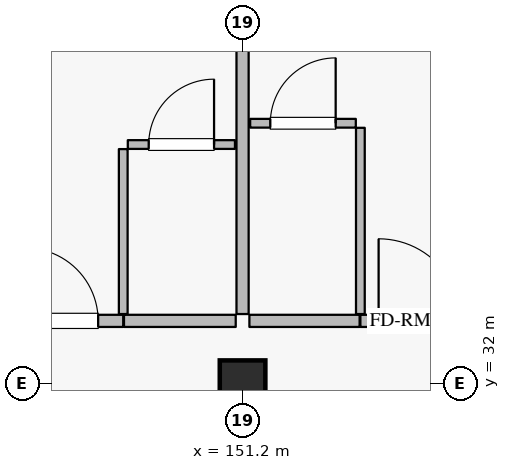
"""IFC4 building model, lengths in metres.
Left out: names, types, materials, properties, quantities, classifications, styles, units other than length and angle.
Written with IfcOpenShell. Run it as: python <this file> out.ifc"""

import sys

from ifc_helpers import new_model, si_unit, direction, frame, frame_2d, origin, origin_2d, place, context, subcontext, project, spatial, rectangle, extrude, element, fill, save


model = new_model("IFC4")
c1 = context("Model", 3, precision=1e-05, world=origin(), true_north=direction((0.0, 1.0)))
c2 = subcontext(c1, "Body", "Model", "MODEL_VIEW")
j1 = project(units=[si_unit("LENGTHUNIT", "METRE"), si_unit("PLANEANGLEUNIT", "RADIAN")], contexts=[c1])
p1 = place(None, origin())
s1 = spatial("IfcSite", under=j1, at=p1, CompositionType="ELEMENT")
p2 = place(p1, origin())
s2 = spatial("IfcBuilding", under=s1, at=p2, CompositionType="ELEMENT")
p3 = place(p2, frame((0.0, 0.0, 39.6)))
s3 = spatial("IfcBuildingStorey", under=s2, at=p3, CompositionType="ELEMENT", Elevation=39.6)
p4 = place(p3, frame((151.2, 32.0, 0.0), z_axis=(0.0, 0.0, 1.0), x_axis=(1.0, 0.0, 0.0)))
e1 = element("IfcColumn", 1, at=p4, inside=s3, PredefinedType="COLUMN", context=c2, shape_type="SweptSolid", body=[
    extrude(rectangle(XDim=0.6, YDim=0.6, at=origin_2d()), origin(), (0.0, 0.0, 1.0), 3.6),
])
p5 = place(p3, frame((143.1, 32.286, 0.0), z_axis=(0.0, 0.0, 1.0), x_axis=(0.724145477467, 0.689647248573, 0.0)))
e2 = element("IfcWall", 2, at=p5, inside=s3, PredefinedType="SOLIDWALL", context=c2, shape_type="SweptSolid", body=[
    extrude(rectangle(XDim=10.771, YDim=0.24, at=frame_2d((5.385, 0.0))), origin(), (0.0, 0.0, 1.0), 2.94),
])
p6 = place(p5, frame((0.194, 0.0, 0.8)))
e3 = element("IfcOpeningElement", 3, at=p6, cuts=e2, PredefinedType="OPENING", context=c2, shape_type="SweptSolid", body=[
    extrude(rectangle(XDim=1.6, YDim=1.6, at=frame_2d((0.8, 0.8))), frame((0.0, 0.13, 0.0), z_axis=(0.0, -1.0, 0.0), x_axis=(1.0, 0.0, 0.0)), (0.0, 0.0, 1.0), 0.26),
])
p7 = place(p5, frame((3.591, 0.0, 0.8)))
e4 = element("IfcOpeningElement", 4, at=p7, cuts=e2, PredefinedType="OPENING", context=c2, shape_type="SweptSolid", body=[
    extrude(rectangle(XDim=1.6, YDim=1.6, at=frame_2d((0.8, 0.8))), frame((0.0, 0.13, 0.0), z_axis=(0.0, -1.0, 0.0), x_axis=(1.0, 0.0, 0.0)), (0.0, 0.0, 1.0), 0.26),
])
p8 = place(p5, frame((7.983, 0.0, 0.8)))
e5 = element("IfcOpeningElement", 5, at=p8, cuts=e2, PredefinedType="OPENING", context=c2, shape_type="SweptSolid", body=[
    extrude(rectangle(XDim=1.6, YDim=1.6, at=frame_2d((0.8, 0.8))), frame((0.0, 0.13, 0.0), z_axis=(0.0, -1.0, 0.0), x_axis=(1.0, 0.0, 0.0)), (0.0, 0.0, 1.0), 0.26),
])
p9 = place(p3, frame((148.01, 32.82, 0.0), z_axis=(0.0, 0.0, 1.0), x_axis=(1.0, 0.0, 0.0)))
e6 = element("IfcWall", 6, at=p9, inside=s3, PredefinedType="PARTITIONING", context=c2, shape_type="SweptSolid", body=[
    extrude(rectangle(XDim=1.62, YDim=0.16, at=frame_2d((0.81, 0.0))), origin(), (0.0, 0.0, 1.0), 3.335),
])
p10 = place(p9, frame((0.33, 0.0, 0.0)))
e7 = element("IfcOpeningElement", 7, at=p10, cuts=e6, PredefinedType="OPENING", context=c2, shape_type="SweptSolid", body=[
    extrude(rectangle(XDim=0.96, YDim=2.2, at=frame_2d((0.48, 1.1))), frame((0.0, 0.09, 0.0), z_axis=(0.0, -1.0, 0.0), x_axis=(1.0, 0.0, 0.0)), (0.0, 0.0, 1.0), 0.18),
])
p11 = place(p3, frame((149.64, 32.82, 0.0), z_axis=(0.0, 0.0, 1.0), x_axis=(1.0, 0.0, 0.0)))
e8 = element("IfcWall", 8, at=p11, inside=s3, PredefinedType="PARTITIONING", context=c2, shape_type="SweptSolid", body=[
    extrude(rectangle(XDim=1.47, YDim=0.16, at=frame_2d((0.735, 0.0))), origin(), (0.0, 0.0, 1.0), 3.335),
])
p12 = place(p3, frame((149.63, 32.91, 0.0), z_axis=(0.0, 0.0, 1.0), x_axis=(0.0, 1.0, 0.0)))
e9 = element("IfcWall", 9, at=p12, inside=s3, PredefinedType="PARTITIONING", context=c2, shape_type="SweptSolid", body=[
    extrude(rectangle(XDim=2.17, YDim=0.115, at=frame_2d((1.085, 0.0))), origin(), (0.0, 0.0, 1.0), 3.335),
])
p13 = place(p3, frame((149.69, 35.14, 0.0), z_axis=(0.0, 0.0, 1.0), x_axis=(1.0, 0.0, 0.0)))
e10 = element("IfcWall", 10, at=p13, inside=s3, PredefinedType="PARTITIONING", context=c2, shape_type="SweptSolid", body=[
    extrude(rectangle(XDim=1.41, YDim=0.115, at=frame_2d((0.705, 0.0))), origin(), (0.0, 0.0, 1.0), 3.335),
])
p14 = place(p13, frame((0.275, 0.0, 0.0)))
e11 = element("IfcOpeningElement", 11, at=p14, cuts=e10, PredefinedType="OPENING", context=c2, shape_type="SweptSolid", body=[
    extrude(rectangle(XDim=0.86, YDim=2.12, at=frame_2d((0.43, 1.06))), frame((0.0, 0.067, 0.0), z_axis=(0.0, -1.0, 0.0), x_axis=(1.0, 0.0, 0.0)), (0.0, 0.0, 1.0), 0.135),
])
p15 = place(p3, frame((151.29, 32.82, 0.0), z_axis=(0.0, 0.0, 1.0), x_axis=(1.0, 0.0, 0.0)))
e12 = element("IfcWall", 12, at=p15, inside=s3, PredefinedType="PARTITIONING", context=c2, shape_type="SweptSolid", body=[
    extrude(rectangle(XDim=1.45, YDim=0.16, at=frame_2d((0.725, 0.0))), origin(), (0.0, 0.0, 1.0), 3.335),
])
p16 = place(p3, frame((152.75, 32.82, 0.0), z_axis=(0.0, 0.0, 1.0), x_axis=(1.0, 0.0, 0.0)))
e13 = element("IfcWall", 13, at=p16, inside=s3, PredefinedType="PARTITIONING", context=c2, shape_type="SweptSolid", body=[
    extrude(rectangle(XDim=1.56, YDim=0.16, at=frame_2d((0.78, 0.0))), origin(), (0.0, 0.0, 1.0), 3.335),
])
p17 = place(p16, frame((0.24, 0.0, 0.0)))
e14 = element("IfcOpeningElement", 14, at=p17, cuts=e13, PredefinedType="OPENING", context=c2, shape_type="SweptSolid", body=[
    extrude(rectangle(XDim=1.08, YDim=2.3, at=frame_2d((0.54, 1.15))), frame((0.0, 0.09, 0.0), z_axis=(0.0, -1.0, 0.0), x_axis=(1.0, 0.0, 0.0)), (0.0, 0.0, 1.0), 0.18),
])
p18 = place(p3, frame((152.75, 32.91, 0.0), z_axis=(0.0, 0.0, 1.0), x_axis=(0.0, 1.0, 0.0)))
e15 = element("IfcWall", 15, at=p18, inside=s3, PredefinedType="PARTITIONING", context=c2, shape_type="SweptSolid", body=[
    extrude(rectangle(XDim=2.45, YDim=0.115, at=frame_2d((1.225, 0.0))), origin(), (0.0, 0.0, 1.0), 3.335),
])
p19 = place(p3, frame((151.3, 35.42, 0.0), z_axis=(0.0, 0.0, 1.0), x_axis=(1.0, 0.0, 0.0)))
e16 = element("IfcWall", 16, at=p19, inside=s3, PredefinedType="PARTITIONING", context=c2, shape_type="SweptSolid", body=[
    extrude(rectangle(XDim=1.39, YDim=0.115, at=frame_2d((0.695, 0.0))), origin(), (0.0, 0.0, 1.0), 3.335),
])
p20 = place(p19, frame((0.265, 0.0, 0.0)))
e17 = element("IfcOpeningElement", 17, at=p20, cuts=e16, PredefinedType="OPENING", context=c2, shape_type="SweptSolid", body=[
    extrude(rectangle(XDim=0.86, YDim=2.12, at=frame_2d((0.43, 1.06))), frame((0.0, 0.067, 0.0), z_axis=(0.0, -1.0, 0.0), x_axis=(1.0, 0.0, 0.0)), (0.0, 0.0, 1.0), 0.135),
])
p21 = place(p3, frame((151.2, 32.91, 0.0), z_axis=(0.0, 0.0, 1.0), x_axis=(0.0, 1.0, 0.0)))
e18 = element("IfcWall", 18, at=p21, inside=s3, PredefinedType="PARTITIONING", context=c2, shape_type="SweptSolid", body=[
    extrude(rectangle(XDim=6.75, YDim=0.16, at=frame_2d((3.375, 0.0))), origin(), (0.0, 0.0, 1.0), 2.74),
])
p22 = place(p10, origin())
e19 = element("IfcDoor", 19, at=p22, inside=s3, OperationType="SINGLE_SWING_LEFT", PredefinedType="DOOR", context=c2, shape_type="SweptSolid", body=[
    extrude(rectangle(XDim=0.96, YDim=2.2, at=frame_2d((0.48, 1.1))), frame((0.0, 0.025, 0.0), z_axis=(0.0, -1.0, 0.0), x_axis=(1.0, 0.0, 0.0)), (0.0, 0.0, 1.0), 0.05),
])
fill(e7, e19)
p23 = place(p14, origin())
e20 = element("IfcDoor", 20, at=p23, inside=s3, OperationType="SINGLE_SWING_RIGHT", PredefinedType="DOOR", context=c2, shape_type="SweptSolid", body=[
    extrude(rectangle(XDim=0.86, YDim=2.12, at=frame_2d((0.43, 1.06))), frame((0.0, 0.025, 0.0), z_axis=(0.0, -1.0, 0.0), x_axis=(1.0, 0.0, 0.0)), (0.0, 0.0, 1.0), 0.05),
])
fill(e11, e20)
p24 = place(p17, origin())
e21 = element("IfcDoor", 21, at=p24, inside=s3, OperationType="SINGLE_SWING_LEFT", PredefinedType="DOOR", context=c2, shape_type="SweptSolid", body=[
    extrude(rectangle(XDim=1.08, YDim=2.3, at=frame_2d((0.54, 1.15))), frame((0.0, 0.025, 0.0), z_axis=(0.0, -1.0, 0.0), x_axis=(1.0, 0.0, 0.0)), (0.0, 0.0, 1.0), 0.05),
])
fill(e14, e21)
p25 = place(p20, origin())
e22 = element("IfcDoor", 22, at=p25, inside=s3, OperationType="SINGLE_SWING_RIGHT", PredefinedType="DOOR", context=c2, shape_type="SweptSolid", body=[
    extrude(rectangle(XDim=0.86, YDim=2.12, at=frame_2d((0.43, 1.06))), frame((0.0, 0.025, 0.0), z_axis=(0.0, -1.0, 0.0), x_axis=(1.0, 0.0, 0.0)), (0.0, 0.0, 1.0), 0.05),
])
fill(e17, e22)
save(model, sys.argv[1])
